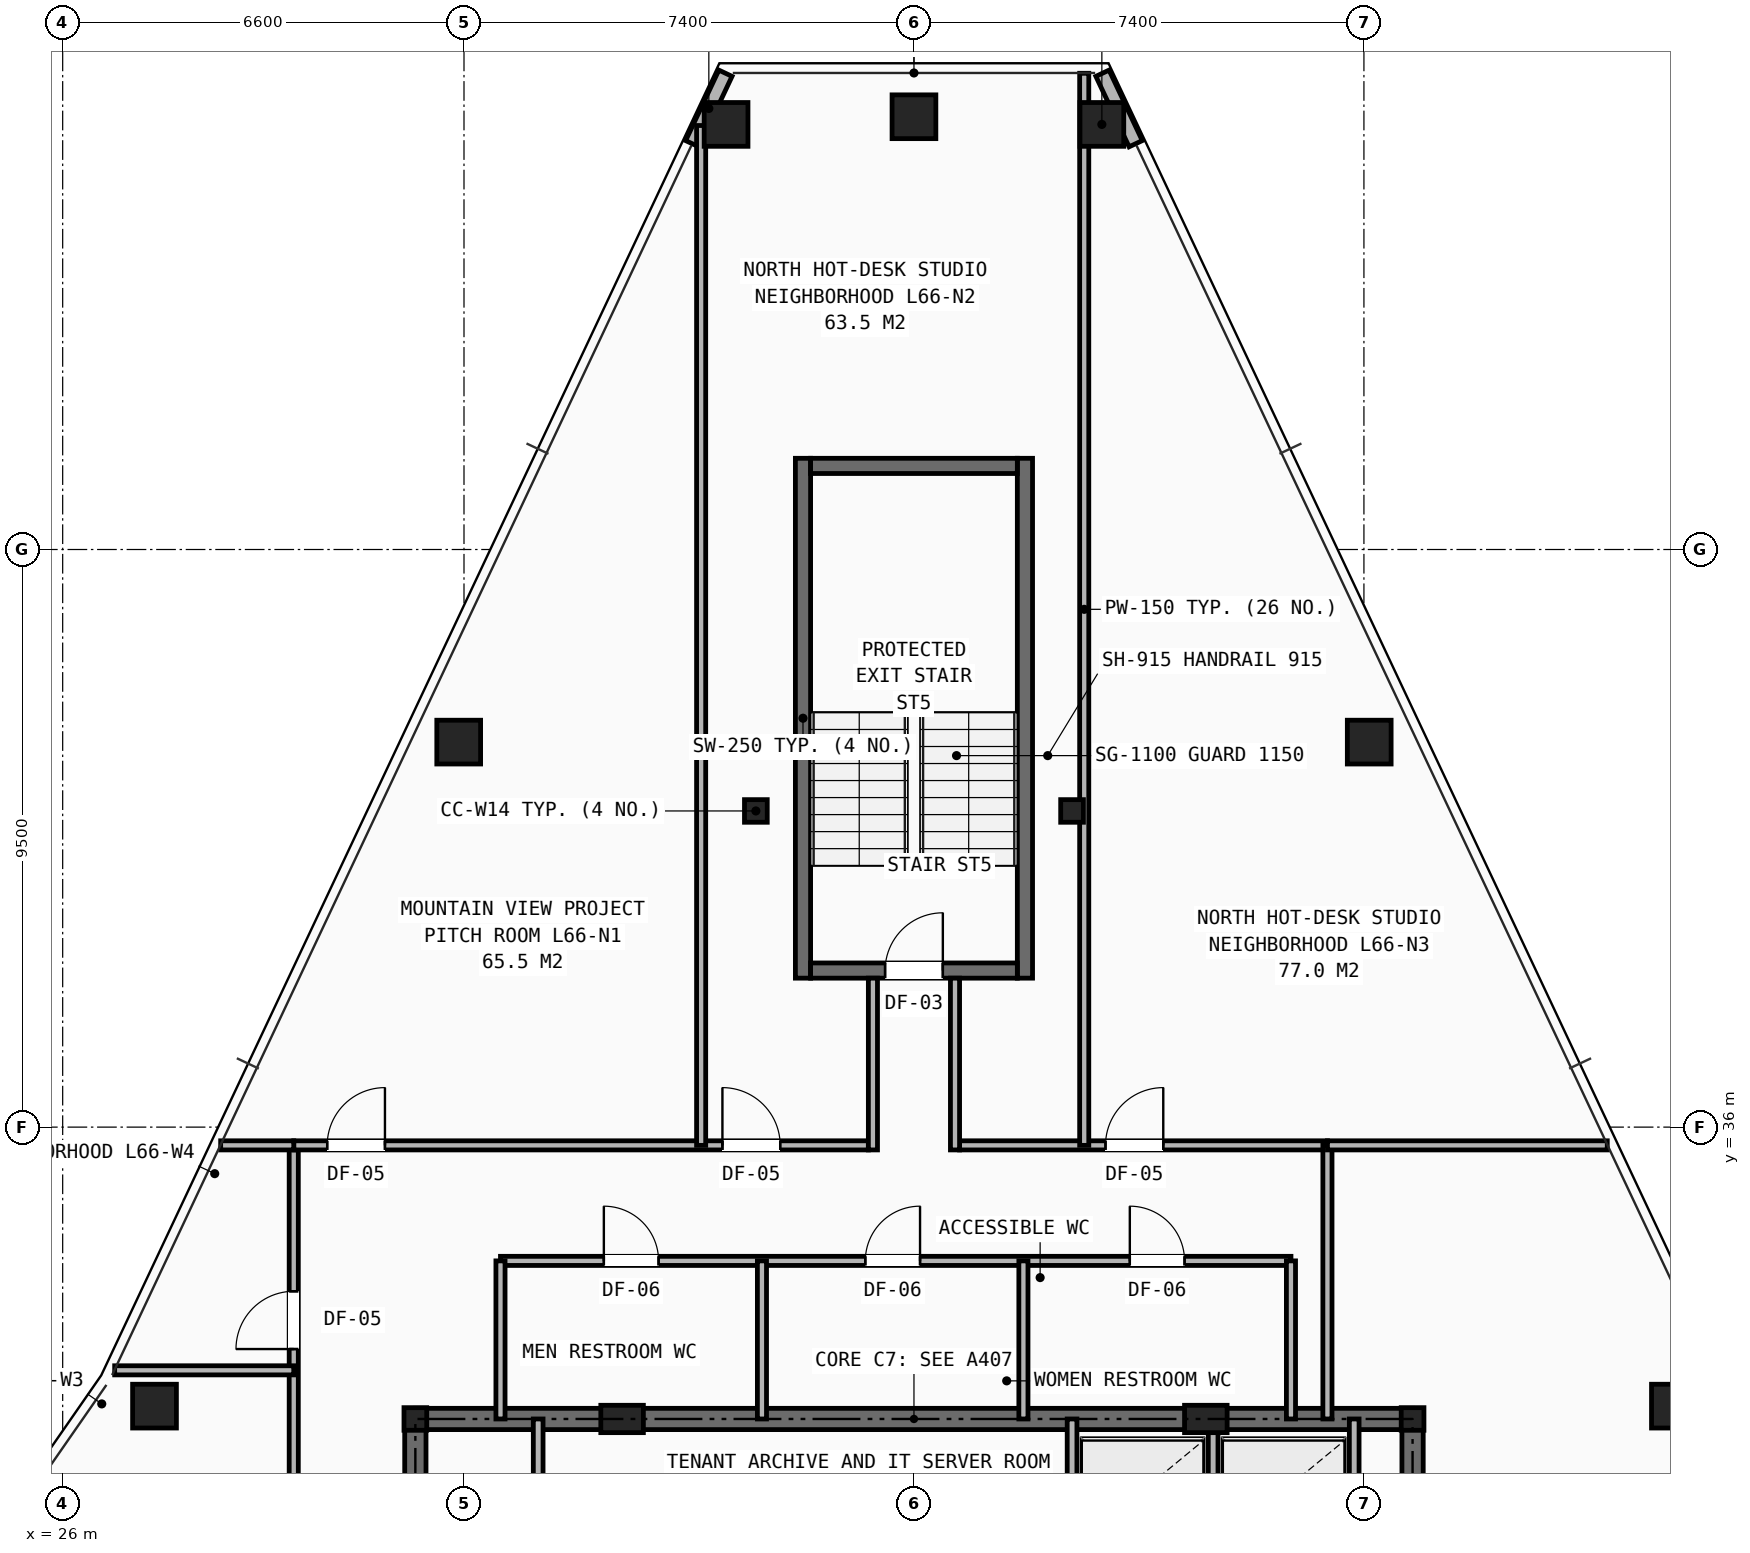
"""IFC4 building model, lengths in metres.
Left out: names, types, materials, properties, quantities, classifications, styles, units other than length and angle.
Written with IfcOpenShell. Run it as: python <this file> out.ifc"""

import sys

from ifc_helpers import new_model, si_unit, direction, frame, frame_2d, origin, origin_2d, place, context, subcontext, project, spatial, rectangle, hollow_rectangle, i_section, extrude, element, fill, save


model = new_model("IFC4")
c1 = context("Model", 3, precision=1e-05, world=origin(), true_north=direction((0.0, 1.0)))
c2 = subcontext(c1, "Body", "Model", "MODEL_VIEW")
j1 = project(units=[si_unit("LENGTHUNIT", "METRE"), si_unit("PLANEANGLEUNIT", "RADIAN")], contexts=[c1])
p1 = place(None, origin())
s1 = spatial("IfcSite", under=j1, at=p1, CompositionType="ELEMENT")
p2 = place(p1, origin())
s2 = spatial("IfcBuilding", under=s1, at=p2, CompositionType="ELEMENT")
p3 = place(p2, frame((0.0, 0.0, 232.9)))
s3 = spatial("IfcBuildingStorey", under=s2, at=p3, CompositionType="ELEMENT", Elevation=232.9)
for number, where, z_axis, x_axis in (
    (1, (31.8, 31.2, 0.0), (0.0, 0.0, 1.0), (1.0, 0.0, 0.0)),
    (2, (48.2, 31.2, 0.0), (0.0, 0.0, 1.0), (1.0, 0.0, 0.0)),
    (3, (37.4, 41.2, 0.0), (0.0, 0.0, 1.0), (1.0, 0.0, 0.0)),
    (4, (42.6, 41.2, 0.0), (0.0, 0.0, 1.0), (1.0, 0.0, 0.0)),
):
    element("IfcColumn", number, at=place(p3, frame(where, z_axis=z_axis, x_axis=x_axis)), inside=s3, PredefinedType="COLUMN", context=c2, shape_type="SweptSolid", body=[
        extrude(i_section(OverallWidth=0.374, OverallDepth=0.372, WebThickness=0.016, FlangeThickness=0.026, at=origin_2d()), origin(), (0.0, 0.0, 1.0), 3.5),
    ])
for number, where, z_axis, x_axis in (
    (5, (35.2, 31.2, 0.0), (0.0, 0.0, 1.0), (1.0, 0.0, 0.0)),
    (6, (44.8, 31.2, 0.0), (0.0, 0.0, 1.0), (1.0, 0.0, 0.0)),
):
    element("IfcColumn", number, at=place(p3, frame(where, z_axis=z_axis, x_axis=x_axis)), inside=s3, PredefinedType="PILASTER", context=c2, shape_type="SweptSolid", body=[
        extrude(rectangle(XDim=0.7, YDim=0.45, at=origin_2d()), origin(), (0.0, 0.0, 1.0), 3.5),
    ])
for number, where, z_axis, x_axis in (
    (7, (43.09, 52.491, 0.0), (0.0, 0.0, 1.0), (1.0, 0.0, 0.0)),
    (8, (40.0, 52.617, 0.0), (0.0, 0.0, 1.0), (1.0, 0.0, 0.0)),
    (9, (36.91, 52.491, 0.0), (0.0, 0.0, 1.0), (1.0, 0.0, 0.0)),
    (10, (32.513, 42.332, 0.0), (0.0, 0.0, 1.0), (1.0, 0.0, 0.0)),
    (11, (27.51, 31.411, 0.0), (0.0, 0.0, 1.0), (1.0, 0.0, 0.0)),
    (12, (52.49, 31.411, 0.0), (0.0, 0.0, 1.0), (1.0, 0.0, 0.0)),
    (13, (47.487, 42.332, 0.0), (0.0, 0.0, 1.0), (1.0, 0.0, 0.0)),
):
    element("IfcColumn", number, at=place(p3, frame(where, z_axis=z_axis, x_axis=x_axis)), inside=s3, PredefinedType="COLUMN", context=c2, shape_type="SweptSolid", body=[
        extrude(hollow_rectangle(XDim=0.72, YDim=0.72, WallThickness=0.05, at=origin_2d()), origin(), (0.0, 0.0, 1.0), 3.5),
    ])
for number, where, z_axis, x_axis in (
    (14, (36.9, 53.333, 0.0), (0.0, 0.0, 1.0), (-0.426, -0.905, 0.0)),
    (15, (43.646, 52.174, 0.0), (0.0, 0.0, 1.0), (-0.426, 0.905, 0.0)),
):
    element("IfcWall", number, at=place(p3, frame(where, z_axis=z_axis, x_axis=x_axis)), inside=s3, PredefinedType="SHEAR", context=c2, shape_type="SweptSolid", body=[
        extrude(rectangle(XDim=1.281, YDim=0.24, at=frame_2d((0.641, 0.0))), origin(), (0.0, 0.0, 1.0), 2.623),
    ])
p4 = place(p3, frame((31.8, 31.2, 0.0), z_axis=(0.0, 0.0, 1.0), x_axis=(1.0, 0.0, 0.0)))
e16 = element("IfcWall", 16, at=p4, inside=s3, PredefinedType="SHEAR", context=c2, shape_type="SweptSolid", body=[
    extrude(rectangle(XDim=16.4, YDim=0.35, at=frame_2d((8.2, 0.0))), origin(), (0.0, 0.0, 1.0), 3.25),
])
p5 = place(p3, frame((31.8, 16.4, 0.0), z_axis=(0.0, 0.0, 1.0), x_axis=(0.0, 1.0, 0.0)))
e17 = element("IfcWall", 17, at=p5, inside=s3, PredefinedType="SHEAR", context=c2, shape_type="SweptSolid", body=[
    extrude(rectangle(XDim=14.8, YDim=0.35, at=frame_2d((7.4, 0.0))), origin(), (0.0, 0.0, 1.0), 3.25),
])
p6 = place(p5, frame((11.0, 0.0, 0.0)))
e18 = element("IfcOpeningElement", 18, at=p6, cuts=e17, PredefinedType="OPENING", context=c2, shape_type="SweptSolid", body=[
    extrude(rectangle(XDim=1.1, YDim=2.15, at=frame_2d((0.55, 1.075))), frame((0.0, 0.185, 0.0), z_axis=(0.0, -1.0, 0.0), x_axis=(1.0, 0.0, 0.0)), (0.0, 0.0, 1.0), 0.37),
])
p7 = place(p3, frame((48.2, 16.4, 0.0), z_axis=(0.0, 0.0, 1.0), x_axis=(0.0, 1.0, 0.0)))
e19 = element("IfcWall", 19, at=p7, inside=s3, PredefinedType="SHEAR", context=c2, shape_type="SweptSolid", body=[
    extrude(rectangle(XDim=14.8, YDim=0.35, at=frame_2d((7.4, 0.0))), origin(), (0.0, 0.0, 1.0), 3.25),
])
p8 = place(p7, frame((11.0, 0.0, 0.0)))
e20 = element("IfcOpeningElement", 20, at=p8, cuts=e19, PredefinedType="OPENING", context=c2, shape_type="SweptSolid", body=[
    extrude(rectangle(XDim=1.1, YDim=2.15, at=frame_2d((0.55, 1.075))), frame((0.0, 0.185, 0.0), z_axis=(0.0, -1.0, 0.0), x_axis=(1.0, 0.0, 0.0)), (0.0, 0.0, 1.0), 0.37),
])
for number, where, z_axis, x_axis in (
    (21, (33.82, 29.02, 0.0), (0.0, 0.0, 1.0), (0.0, 1.0, 0.0)),
    (22, (42.6, 29.02, 0.0), (0.0, 0.0, 1.0), (0.0, 1.0, 0.0)),
    (23, (44.92, 29.02, 0.0), (0.0, 0.0, 1.0), (0.0, 1.0, 0.0)),
    (24, (47.24, 29.02, 0.0), (0.0, 0.0, 1.0), (0.0, 1.0, 0.0)),
):
    element("IfcWall", number, at=place(p3, frame(where, z_axis=z_axis, x_axis=x_axis)), inside=s3, PredefinedType="SOLIDWALL", context=c2, shape_type="SweptSolid", body=[
        extrude(rectangle(XDim=2.18, YDim=0.16, at=frame_2d((1.09, 0.0))), origin(), (0.0, 0.0, 1.0), 2.705),
    ])
p9 = place(p3, frame((33.2, 33.8, 0.0), z_axis=(0.0, 0.0, 1.0), x_axis=(1.0, 0.0, 0.0)))
e25 = element("IfcWall", 25, at=p9, inside=s3, PredefinedType="PARTITIONING", context=c2, shape_type="SweptSolid", body=[
    extrude(rectangle(XDim=13.0, YDim=0.15, at=frame_2d((6.5, 0.0))), origin(), (0.0, 0.0, 1.0), 3.25),
])
p10 = place(p9, frame((1.7, 0.0, 0.0)))
e26 = element("IfcOpeningElement", 26, at=p10, cuts=e25, PredefinedType="OPENING", context=c2, shape_type="SweptSolid", body=[
    extrude(rectangle(XDim=0.9, YDim=2.1, at=frame_2d((0.45, 1.05))), frame((0.0, 0.085, 0.0), z_axis=(0.0, -1.0, 0.0), x_axis=(1.0, 0.0, 0.0)), (0.0, 0.0, 1.0), 0.17),
])
p11 = place(p9, frame((6.0, 0.0, 0.0)))
e27 = element("IfcOpeningElement", 27, at=p11, cuts=e25, PredefinedType="OPENING", context=c2, shape_type="SweptSolid", body=[
    extrude(rectangle(XDim=0.9, YDim=2.1, at=frame_2d((0.45, 1.05))), frame((0.0, 0.085, 0.0), z_axis=(0.0, -1.0, 0.0), x_axis=(1.0, 0.0, 0.0)), (0.0, 0.0, 1.0), 0.17),
])
p12 = place(p9, frame((10.35, 0.0, 0.0)))
e28 = element("IfcOpeningElement", 28, at=p12, cuts=e25, PredefinedType="OPENING", context=c2, shape_type="SweptSolid", body=[
    extrude(rectangle(XDim=0.9, YDim=2.1, at=frame_2d((0.45, 1.05))), frame((0.0, 0.085, 0.0), z_axis=(0.0, -1.0, 0.0), x_axis=(1.0, 0.0, 0.0)), (0.0, 0.0, 1.0), 0.17),
])
for number, where, z_axis, x_axis in (
    (29, (33.2, 31.2, 0.0), (0.0, 0.0, 1.0), (0.0, 1.0, 0.0)),
    (30, (46.2, 31.2, 0.0), (0.0, 0.0, 1.0), (0.0, 1.0, 0.0)),
    (31, (37.5, 31.2, 0.0), (0.0, 0.0, 1.0), (0.0, 1.0, 0.0)),
    (32, (41.8, 31.2, 0.0), (0.0, 0.0, 1.0), (0.0, 1.0, 0.0)),
):
    element("IfcWall", number, at=place(p3, frame(where, z_axis=z_axis, x_axis=x_axis)), inside=s3, PredefinedType="PARTITIONING", context=c2, shape_type="SweptSolid", body=[
        extrude(rectangle(XDim=2.6, YDim=0.15, at=frame_2d((1.3, 0.0))), origin(), (0.0, 0.0, 1.0), 2.705),
    ])
p13 = place(p3, frame((29.8, 16.4, 0.0), z_axis=(0.0, 0.0, 1.0), x_axis=(0.0, 1.0, 0.0)))
e33 = element("IfcWall", 33, at=p13, inside=s3, PredefinedType="PARTITIONING", context=c2, shape_type="SweptSolid", body=[
    extrude(rectangle(XDim=19.3, YDim=0.15, at=frame_2d((9.65, 0.0))), origin(), (0.0, 0.0, 1.0), 2.265),
])
p14 = place(p13, frame((0.35, 0.0, 0.0)))
e34 = element("IfcOpeningElement", 34, at=p14, cuts=e33, PredefinedType="OPENING", context=c2, shape_type="SweptSolid", body=[
    extrude(rectangle(XDim=0.95, YDim=2.1, at=frame_2d((0.475, 1.05))), frame((0.0, 0.085, 0.0), z_axis=(0.0, -1.0, 0.0), x_axis=(1.0, 0.0, 0.0)), (0.0, 0.0, 1.0), 0.17),
])
p15 = place(p13, frame((4.95, 0.0, 0.0)))
e35 = element("IfcOpeningElement", 35, at=p15, cuts=e33, PredefinedType="OPENING", context=c2, shape_type="SweptSolid", body=[
    extrude(rectangle(XDim=0.95, YDim=2.1, at=frame_2d((0.475, 1.05))), frame((0.0, 0.085, 0.0), z_axis=(0.0, -1.0, 0.0), x_axis=(1.0, 0.0, 0.0)), (0.0, 0.0, 1.0), 0.17),
])
p16 = place(p13, frame((11.45, 0.0, 0.0)))
e36 = element("IfcOpeningElement", 36, at=p16, cuts=e33, PredefinedType="OPENING", context=c2, shape_type="SweptSolid", body=[
    extrude(rectangle(XDim=0.95, YDim=2.1, at=frame_2d((0.475, 1.05))), frame((0.0, 0.085, 0.0), z_axis=(0.0, -1.0, 0.0), x_axis=(1.0, 0.0, 0.0)), (0.0, 0.0, 1.0), 0.17),
])
p17 = place(p13, frame((15.95, 0.0, 0.0)))
e37 = element("IfcOpeningElement", 37, at=p17, cuts=e33, PredefinedType="OPENING", context=c2, shape_type="SweptSolid", body=[
    extrude(rectangle(XDim=0.95, YDim=2.1, at=frame_2d((0.475, 1.05))), frame((0.0, 0.085, 0.0), z_axis=(0.0, -1.0, 0.0), x_axis=(1.0, 0.0, 0.0)), (0.0, 0.0, 1.0), 0.17),
])
p18 = place(p3, frame((29.8, 35.7, 0.0), z_axis=(0.0, 0.0, 1.0), x_axis=(1.0, 0.0, 0.0)))
e38 = element("IfcWall", 38, at=p18, inside=s3, PredefinedType="PARTITIONING", context=c2, shape_type="SweptSolid", body=[
    extrude(rectangle(XDim=9.45, YDim=0.15, at=frame_2d((4.725, 0.0))), origin(), (0.0, 0.0, 1.0), 2.628),
])
p19 = place(p18, frame((0.55, 0.0, 0.0)))
e39 = element("IfcOpeningElement", 39, at=p19, cuts=e38, PredefinedType="OPENING", context=c2, shape_type="SweptSolid", body=[
    extrude(rectangle(XDim=0.95, YDim=2.1, at=frame_2d((0.475, 1.05))), frame((0.0, 0.085, 0.0), z_axis=(0.0, -1.0, 0.0), x_axis=(1.0, 0.0, 0.0)), (0.0, 0.0, 1.0), 0.17),
])
p20 = place(p18, frame((7.05, 0.0, 0.0)))
e40 = element("IfcOpeningElement", 40, at=p20, cuts=e38, PredefinedType="OPENING", context=c2, shape_type="SweptSolid", body=[
    extrude(rectangle(XDim=0.95, YDim=2.1, at=frame_2d((0.475, 1.05))), frame((0.0, 0.085, 0.0), z_axis=(0.0, -1.0, 0.0), x_axis=(1.0, 0.0, 0.0)), (0.0, 0.0, 1.0), 0.17),
])
p21 = place(p3, frame((40.75, 35.7, 0.0), z_axis=(0.0, 0.0, 1.0), x_axis=(1.0, 0.0, 0.0)))
e41 = element("IfcWall", 41, at=p21, inside=s3, PredefinedType="PARTITIONING", context=c2, shape_type="SweptSolid", body=[
    extrude(rectangle(XDim=6.05, YDim=0.15, at=frame_2d((3.025, 0.0))), origin(), (0.0, 0.0, 1.0), 3.25),
])
p22 = place(p21, frame((2.4, 0.0, 0.0)))
e42 = element("IfcOpeningElement", 42, at=p22, cuts=e41, PredefinedType="OPENING", context=c2, shape_type="SweptSolid", body=[
    extrude(rectangle(XDim=0.95, YDim=2.1, at=frame_2d((0.475, 1.05))), frame((0.0, 0.085, 0.0), z_axis=(0.0, -1.0, 0.0), x_axis=(1.0, 0.0, 0.0)), (0.0, 0.0, 1.0), 0.17),
])
p23 = place(p3, frame((46.8, 31.2, 0.0), z_axis=(0.0, 0.0, 1.0), x_axis=(0.0, 1.0, 0.0)))
e43 = element("IfcWall", 43, at=p23, inside=s3, PredefinedType="PARTITIONING", context=c2, shape_type="SweptSolid", body=[
    extrude(rectangle(XDim=4.5, YDim=0.15, at=frame_2d((2.25, 0.0))), origin(), (0.0, 0.0, 1.0), 2.705),
])
p24 = place(p3, frame((28.598, 35.7, 0.0), z_axis=(0.0, 0.0, 1.0), x_axis=(1.0, 0.0, 0.0)))
e44 = element("IfcWall", 44, at=p24, inside=s3, PredefinedType="PARTITIONING", context=c2, shape_type="SweptSolid", body=[
    extrude(rectangle(XDim=1.202, YDim=0.15, at=frame_2d((0.601, 0.0))), origin(), (0.0, 0.0, 1.0), 2.628),
])
p25 = place(p3, frame((26.855, 32.0, 0.0), z_axis=(0.0, 0.0, 1.0), x_axis=(1.0, 0.0, 0.0)))
e45 = element("IfcWall", 45, at=p25, inside=s3, PredefinedType="PARTITIONING", context=c2, shape_type="SweptSolid", body=[
    extrude(rectangle(XDim=2.945, YDim=0.15, at=frame_2d((1.473, 0.0))), origin(), (0.0, 0.0, 1.0), 2.628),
])
p26 = place(p3, frame((46.8, 35.7, 0.0), z_axis=(0.0, 0.0, 1.0), x_axis=(1.0, 0.0, 0.0)))
e46 = element("IfcWall", 46, at=p26, inside=s3, PredefinedType="PARTITIONING", context=c2, shape_type="SweptSolid", body=[
    extrude(rectangle(XDim=4.602, YDim=0.15, at=frame_2d((2.301, 0.0))), origin(), (0.0, 0.0, 1.0), 2.628),
])
p27 = place(p3, frame((36.5, 35.7, 0.0), z_axis=(0.0, 0.0, 1.0), x_axis=(0.0, 1.0, 0.0)))
e47 = element("IfcWall", 47, at=p27, inside=s3, PredefinedType="PARTITIONING", context=c2, shape_type="SweptSolid", body=[
    extrude(rectangle(XDim=16.773, YDim=0.15, at=frame_2d((8.387, 0.0))), origin(), (0.0, 0.0, 1.0), 2.265),
])
p28 = place(p3, frame((42.8, 35.7, 0.0), z_axis=(0.0, 0.0, 1.0), x_axis=(0.0, 1.0, 0.0)))
e48 = element("IfcWall", 48, at=p28, inside=s3, PredefinedType="PARTITIONING", context=c2, shape_type="SweptSolid", body=[
    extrude(rectangle(XDim=17.633, YDim=0.15, at=frame_2d((8.816, 0.0))), origin(), (0.0, 0.0, 1.0), 2.265),
])
for number, where, z_axis, x_axis in (
    (49, (38.175, 38.45, 0.0), (0.0, 0.0, 1.0), (0.0, 1.0, 0.0)),
    (50, (41.825, 38.45, 0.0), (0.0, 0.0, 1.0), (0.0, 1.0, 0.0)),
):
    element("IfcWall", number, at=place(p3, frame(where, z_axis=z_axis, x_axis=x_axis)), inside=s3, PredefinedType="SHEAR", context=c2, shape_type="SweptSolid", body=[
        extrude(rectangle(XDim=8.55, YDim=0.25, at=frame_2d((4.275, 0.0))), origin(), (0.0, 0.0, 1.0), 3.25),
    ])
p29 = place(p3, frame((38.3, 38.575, 0.0), z_axis=(0.0, 0.0, 1.0), x_axis=(1.0, 0.0, 0.0)))
e51 = element("IfcWall", 51, at=p29, inside=s3, PredefinedType="SHEAR", context=c2, shape_type="SweptSolid", body=[
    extrude(rectangle(XDim=3.4, YDim=0.25, at=frame_2d((1.7, 0.0))), origin(), (0.0, 0.0, 1.0), 3.25),
])
p30 = place(p29, frame((1.225, 0.0, 0.0)))
e52 = element("IfcOpeningElement", 52, at=p30, cuts=e51, PredefinedType="OPENING", context=c2, shape_type="SweptSolid", body=[
    extrude(rectangle(XDim=0.95, YDim=2.1, at=frame_2d((0.475, 1.05))), frame((0.0, 0.135, 0.0), z_axis=(0.0, -1.0, 0.0), x_axis=(1.0, 0.0, 0.0)), (0.0, 0.0, 1.0), 0.27),
])
p31 = place(p3, frame((38.3, 46.875, 0.0), z_axis=(0.0, 0.0, 1.0), x_axis=(1.0, 0.0, 0.0)))
e53 = element("IfcWall", 53, at=p31, inside=s3, PredefinedType="SHEAR", context=c2, shape_type="SweptSolid", body=[
    extrude(rectangle(XDim=3.4, YDim=0.25, at=frame_2d((1.7, 0.0))), origin(), (0.0, 0.0, 1.0), 3.25),
])
for number, where, z_axis, x_axis in (
    (54, (39.325, 35.625, 0.0), (0.0, 0.0, 1.0), (0.0, 1.0, 0.0)),
    (55, (40.675, 35.625, 0.0), (0.0, 0.0, 1.0), (0.0, 1.0, 0.0)),
):
    element("IfcWall", number, at=place(p3, frame(where, z_axis=z_axis, x_axis=x_axis)), inside=s3, PredefinedType="PARTITIONING", context=c2, shape_type="SweptSolid", body=[
        extrude(rectangle(XDim=2.825, YDim=0.15, at=frame_2d((1.413, 0.0))), origin(), (0.0, 0.0, 1.0), 3.25),
    ])
p32 = place(p10, origin())
e56 = element("IfcDoor", 56, at=p32, inside=s3, OperationType="SINGLE_SWING_LEFT", PredefinedType="DOOR", context=c2, shape_type="SweptSolid", body=[
    extrude(rectangle(XDim=0.9, YDim=2.1, at=frame_2d((0.45, 1.05))), frame((0.0, 0.025, 0.0), z_axis=(0.0, -1.0, 0.0), x_axis=(1.0, 0.0, 0.0)), (0.0, 0.0, 1.0), 0.05),
])
fill(e26, e56)
p33 = place(p11, origin())
e57 = element("IfcDoor", 57, at=p33, inside=s3, OperationType="SINGLE_SWING_RIGHT", PredefinedType="DOOR", context=c2, shape_type="SweptSolid", body=[
    extrude(rectangle(XDim=0.9, YDim=2.1, at=frame_2d((0.45, 1.05))), frame((0.0, 0.025, 0.0), z_axis=(0.0, -1.0, 0.0), x_axis=(1.0, 0.0, 0.0)), (0.0, 0.0, 1.0), 0.05),
])
fill(e27, e57)
p34 = place(p12, origin())
e58 = element("IfcDoor", 58, at=p34, inside=s3, OperationType="SINGLE_SWING_LEFT", PredefinedType="DOOR", context=c2, shape_type="SweptSolid", body=[
    extrude(rectangle(XDim=0.9, YDim=2.1, at=frame_2d((0.45, 1.05))), frame((0.0, 0.025, 0.0), z_axis=(0.0, -1.0, 0.0), x_axis=(1.0, 0.0, 0.0)), (0.0, 0.0, 1.0), 0.05),
])
fill(e28, e58)
p35 = place(p17, origin())
e59 = element("IfcDoor", 59, at=p35, inside=s3, OperationType="SINGLE_SWING_LEFT", PredefinedType="DOOR", context=c2, shape_type="SweptSolid", body=[
    extrude(rectangle(XDim=0.95, YDim=2.1, at=frame_2d((0.475, 1.05))), frame((0.0, 0.025, 0.0), z_axis=(0.0, -1.0, 0.0), x_axis=(1.0, 0.0, 0.0)), (0.0, 0.0, 1.0), 0.05),
])
fill(e37, e59)
p36 = place(p19, origin())
e60 = element("IfcDoor", 60, at=p36, inside=s3, OperationType="SINGLE_SWING_RIGHT", PredefinedType="DOOR", context=c2, shape_type="SweptSolid", body=[
    extrude(rectangle(XDim=0.95, YDim=2.1, at=frame_2d((0.475, 1.05))), frame((0.0, 0.025, 0.0), z_axis=(0.0, -1.0, 0.0), x_axis=(1.0, 0.0, 0.0)), (0.0, 0.0, 1.0), 0.05),
])
fill(e39, e60)
p37 = place(p20, origin())
e61 = element("IfcDoor", 61, at=p37, inside=s3, OperationType="SINGLE_SWING_LEFT", PredefinedType="DOOR", context=c2, shape_type="SweptSolid", body=[
    extrude(rectangle(XDim=0.95, YDim=2.1, at=frame_2d((0.475, 1.05))), frame((0.0, 0.025, 0.0), z_axis=(0.0, -1.0, 0.0), x_axis=(1.0, 0.0, 0.0)), (0.0, 0.0, 1.0), 0.05),
])
fill(e40, e61)
p38 = place(p22, origin())
e62 = element("IfcDoor", 62, at=p38, inside=s3, OperationType="SINGLE_SWING_RIGHT", PredefinedType="DOOR", context=c2, shape_type="SweptSolid", body=[
    extrude(rectangle(XDim=0.95, YDim=2.1, at=frame_2d((0.475, 1.05))), frame((0.0, 0.025, 0.0), z_axis=(0.0, -1.0, 0.0), x_axis=(1.0, 0.0, 0.0)), (0.0, 0.0, 1.0), 0.05),
])
fill(e42, e62)
p39 = place(p30, origin())
e63 = element("IfcDoor", 63, at=p39, inside=s3, OperationType="SINGLE_SWING_RIGHT", PredefinedType="DOOR", context=c2, shape_type="SweptSolid", body=[
    extrude(rectangle(XDim=0.95, YDim=2.1, at=frame_2d((0.475, 1.05))), frame((0.0, 0.025, 0.0), z_axis=(0.0, -1.0, 0.0), x_axis=(1.0, 0.0, 0.0)), (0.0, 0.0, 1.0), 0.05),
])
fill(e52, e63)
save(model, sys.argv[1])
